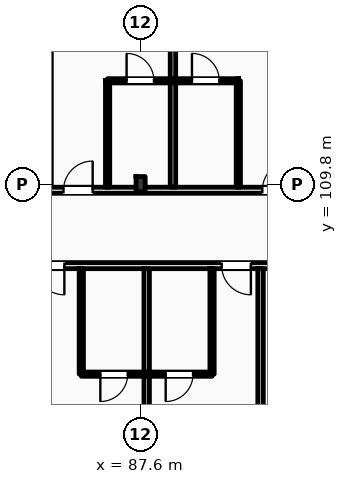
"""IFC4 building model, lengths in metres.
Left out: names, types, materials, properties, quantities, classifications, styles, units other than length and angle.
Written with IfcOpenShell. Run it as: python <this file> out.ifc"""

import sys

from ifc_helpers import new_model, si_unit, direction, frame, frame_2d, origin, origin_2d, place, context, subcontext, project, spatial, rectangle, i_section, extrude, element, fill, save


model = new_model("IFC4")
c1 = context("Model", 3, precision=1e-05, world=origin(), true_north=direction((0.0, 1.0)))
c2 = subcontext(c1, "Body", "Model", "MODEL_VIEW")
j1 = project(units=[si_unit("LENGTHUNIT", "METRE"), si_unit("PLANEANGLEUNIT", "RADIAN")], contexts=[c1])
p1 = place(None, origin())
s1 = spatial("IfcSite", under=j1, at=p1, CompositionType="ELEMENT")
p2 = place(p1, origin())
s2 = spatial("IfcBuilding", under=s1, at=p2, CompositionType="ELEMENT")
p3 = place(p2, frame((0.0, 0.0, 28.2)))
s3 = spatial("IfcBuildingStorey", under=s2, at=p3, CompositionType="ELEMENT", Elevation=28.2)
p4 = place(p3, frame((87.6, 109.8, 0.0), z_axis=(0.0, 0.0, 1.0), x_axis=(1.0, 0.0, 0.0)))
e1 = element("IfcColumn", 1, at=p4, inside=s3, PredefinedType="COLUMN", context=c2, shape_type="SweptSolid", body=[
    extrude(i_section(OverallWidth=0.3, OverallDepth=0.5, WebThickness=0.014, FlangeThickness=0.028, FilletRadius=0.027, at=origin_2d()), origin(), (0.0, 0.0, 1.0), 3.6),
])
p5 = place(p3, frame((10.65, 109.6, 0.0), z_axis=(0.0, 0.0, 1.0), x_axis=(1.0, 0.0, 0.0)))
e2 = element("IfcWall", 2, at=p5, inside=s3, PredefinedType="PARTITIONING", context=c2, shape_type="SweptSolid", body=[
    extrude(rectangle(XDim=109.21, YDim=0.2, at=frame_2d((54.605, 0.0))), origin(), (0.0, 0.0, 1.0), 2.8),
])
p6 = place(p5, frame((12.611, 0.0, 0.0)))
e3 = element("IfcOpeningElement", 3, at=p6, cuts=e2, PredefinedType="OPENING", context=c2, shape_type="SweptSolid", body=[
    extrude(rectangle(XDim=1.02, YDim=2.2, at=frame_2d((0.51, 1.1))), frame((0.0, 0.11, 0.0), z_axis=(0.0, -1.0, 0.0), x_axis=(1.0, 0.0, 0.0)), (0.0, 0.0, 1.0), 0.22),
])
p7 = place(p5, frame((19.451, 0.0, 0.0)))
e4 = element("IfcOpeningElement", 4, at=p7, cuts=e2, PredefinedType="OPENING", context=c2, shape_type="SweptSolid", body=[
    extrude(rectangle(XDim=1.02, YDim=2.2, at=frame_2d((0.51, 1.1))), frame((0.0, 0.11, 0.0), z_axis=(0.0, -1.0, 0.0), x_axis=(1.0, 0.0, 0.0)), (0.0, 0.0, 1.0), 0.22),
])
p8 = place(p5, frame((23.842, 0.0, 0.0)))
e5 = element("IfcOpeningElement", 5, at=p8, cuts=e2, PredefinedType="OPENING", context=c2, shape_type="SweptSolid", body=[
    extrude(rectangle(XDim=1.02, YDim=2.2, at=frame_2d((0.51, 1.1))), frame((0.0, 0.11, 0.0), z_axis=(0.0, -1.0, 0.0), x_axis=(1.0, 0.0, 0.0)), (0.0, 0.0, 1.0), 0.22),
])
p9 = place(p5, frame((26.084, 0.0, 0.0)))
e6 = element("IfcOpeningElement", 6, at=p9, cuts=e2, PredefinedType="OPENING", context=c2, shape_type="SweptSolid", body=[
    extrude(rectangle(XDim=1.02, YDim=2.2, at=frame_2d((0.51, 1.1))), frame((0.0, 0.11, 0.0), z_axis=(0.0, -1.0, 0.0), x_axis=(1.0, 0.0, 0.0)), (0.0, 0.0, 1.0), 0.22),
])
p10 = place(p5, frame((32.655, 0.0, 0.0)))
e7 = element("IfcOpeningElement", 7, at=p10, cuts=e2, PredefinedType="OPENING", context=c2, shape_type="SweptSolid", body=[
    extrude(rectangle(XDim=0.96, YDim=2.2, at=frame_2d((0.48, 1.1))), frame((0.0, 0.11, 0.0), z_axis=(0.0, -1.0, 0.0), x_axis=(1.0, 0.0, 0.0)), (0.0, 0.0, 1.0), 0.22),
])
p11 = place(p5, frame((34.895, 0.0, 0.0)))
e8 = element("IfcOpeningElement", 8, at=p11, cuts=e2, PredefinedType="OPENING", context=c2, shape_type="SweptSolid", body=[
    extrude(rectangle(XDim=0.96, YDim=2.2, at=frame_2d((0.48, 1.1))), frame((0.0, 0.11, 0.0), z_axis=(0.0, -1.0, 0.0), x_axis=(1.0, 0.0, 0.0)), (0.0, 0.0, 1.0), 0.22),
])
p12 = place(p5, frame((41.436, 0.0, 0.0)))
e9 = element("IfcOpeningElement", 9, at=p12, cuts=e2, PredefinedType="OPENING", context=c2, shape_type="SweptSolid", body=[
    extrude(rectangle(XDim=0.96, YDim=2.2, at=frame_2d((0.48, 1.1))), frame((0.0, 0.11, 0.0), z_axis=(0.0, -1.0, 0.0), x_axis=(1.0, 0.0, 0.0)), (0.0, 0.0, 1.0), 0.22),
])
p13 = place(p5, frame((43.427, 0.0, 0.0)))
e10 = element("IfcOpeningElement", 10, at=p13, cuts=e2, PredefinedType="OPENING", context=c2, shape_type="SweptSolid", body=[
    extrude(rectangle(XDim=0.96, YDim=2.2, at=frame_2d((0.48, 1.1))), frame((0.0, 0.11, 0.0), z_axis=(0.0, -1.0, 0.0), x_axis=(1.0, 0.0, 0.0)), (0.0, 0.0, 1.0), 0.22),
])
p14 = place(p5, frame((50.218, 0.0, 0.0)))
e11 = element("IfcOpeningElement", 11, at=p14, cuts=e2, PredefinedType="OPENING", context=c2, shape_type="SweptSolid", body=[
    extrude(rectangle(XDim=0.96, YDim=2.2, at=frame_2d((0.48, 1.1))), frame((0.0, 0.11, 0.0), z_axis=(0.0, -1.0, 0.0), x_axis=(1.0, 0.0, 0.0)), (0.0, 0.0, 1.0), 0.22),
])
p15 = place(p5, frame((54.859, 0.0, 0.0)))
e12 = element("IfcOpeningElement", 12, at=p15, cuts=e2, PredefinedType="OPENING", context=c2, shape_type="SweptSolid", body=[
    extrude(rectangle(XDim=0.96, YDim=2.2, at=frame_2d((0.48, 1.1))), frame((0.0, 0.11, 0.0), z_axis=(0.0, -1.0, 0.0), x_axis=(1.0, 0.0, 0.0)), (0.0, 0.0, 1.0), 0.22),
])
p16 = place(p5, frame((59.0, 0.0, 0.0)))
e13 = element("IfcOpeningElement", 13, at=p16, cuts=e2, PredefinedType="OPENING", context=c2, shape_type="SweptSolid", body=[
    extrude(rectangle(XDim=0.96, YDim=2.2, at=frame_2d((0.48, 1.1))), frame((0.0, 0.11, 0.0), z_axis=(0.0, -1.0, 0.0), x_axis=(1.0, 0.0, 0.0)), (0.0, 0.0, 1.0), 0.22),
])
p17 = place(p5, frame((63.39, 0.0, 0.0)))
e14 = element("IfcOpeningElement", 14, at=p17, cuts=e2, PredefinedType="OPENING", context=c2, shape_type="SweptSolid", body=[
    extrude(rectangle(XDim=0.96, YDim=2.2, at=frame_2d((0.48, 1.1))), frame((0.0, 0.11, 0.0), z_axis=(0.0, -1.0, 0.0), x_axis=(1.0, 0.0, 0.0)), (0.0, 0.0, 1.0), 0.22),
])
p18 = place(p5, frame((65.631, 0.0, 0.0)))
e15 = element("IfcOpeningElement", 15, at=p18, cuts=e2, PredefinedType="OPENING", context=c2, shape_type="SweptSolid", body=[
    extrude(rectangle(XDim=0.96, YDim=2.2, at=frame_2d((0.48, 1.1))), frame((0.0, 0.11, 0.0), z_axis=(0.0, -1.0, 0.0), x_axis=(1.0, 0.0, 0.0)), (0.0, 0.0, 1.0), 0.22),
])
p19 = place(p5, frame((72.172, 0.0, 0.0)))
e16 = element("IfcOpeningElement", 16, at=p19, cuts=e2, PredefinedType="OPENING", context=c2, shape_type="SweptSolid", body=[
    extrude(rectangle(XDim=0.96, YDim=2.2, at=frame_2d((0.48, 1.1))), frame((0.0, 0.11, 0.0), z_axis=(0.0, -1.0, 0.0), x_axis=(1.0, 0.0, 0.0)), (0.0, 0.0, 1.0), 0.22),
])
p20 = place(p5, frame((74.413, 0.0, 0.0)))
e17 = element("IfcOpeningElement", 17, at=p20, cuts=e2, PredefinedType="OPENING", context=c2, shape_type="SweptSolid", body=[
    extrude(rectangle(XDim=0.96, YDim=2.2, at=frame_2d((0.48, 1.1))), frame((0.0, 0.11, 0.0), z_axis=(0.0, -1.0, 0.0), x_axis=(1.0, 0.0, 0.0)), (0.0, 0.0, 1.0), 0.22),
])
p21 = place(p5, frame((80.954, 0.0, 0.0)))
e18 = element("IfcOpeningElement", 18, at=p21, cuts=e2, PredefinedType="OPENING", context=c2, shape_type="SweptSolid", body=[
    extrude(rectangle(XDim=0.96, YDim=2.2, at=frame_2d((0.48, 1.1))), frame((0.0, 0.11, 0.0), z_axis=(0.0, -1.0, 0.0), x_axis=(1.0, 0.0, 0.0)), (0.0, 0.0, 1.0), 0.22),
])
p22 = place(p5, frame((83.195, 0.0, 0.0)))
e19 = element("IfcOpeningElement", 19, at=p22, cuts=e2, PredefinedType="OPENING", context=c2, shape_type="SweptSolid", body=[
    extrude(rectangle(XDim=0.96, YDim=2.2, at=frame_2d((0.48, 1.1))), frame((0.0, 0.11, 0.0), z_axis=(0.0, -1.0, 0.0), x_axis=(1.0, 0.0, 0.0)), (0.0, 0.0, 1.0), 0.22),
])
p23 = place(p5, frame((89.735, 0.0, 0.0)))
e20 = element("IfcOpeningElement", 20, at=p23, cuts=e2, PredefinedType="OPENING", context=c2, shape_type="SweptSolid", body=[
    extrude(rectangle(XDim=0.96, YDim=2.2, at=frame_2d((0.48, 1.1))), frame((0.0, 0.11, 0.0), z_axis=(0.0, -1.0, 0.0), x_axis=(1.0, 0.0, 0.0)), (0.0, 0.0, 1.0), 0.22),
])
p24 = place(p5, frame((94.126, 0.0, 0.0)))
e21 = element("IfcOpeningElement", 21, at=p24, cuts=e2, PredefinedType="OPENING", context=c2, shape_type="SweptSolid", body=[
    extrude(rectangle(XDim=0.96, YDim=2.2, at=frame_2d((0.48, 1.1))), frame((0.0, 0.11, 0.0), z_axis=(0.0, -1.0, 0.0), x_axis=(1.0, 0.0, 0.0)), (0.0, 0.0, 1.0), 0.22),
])
p25 = place(p5, frame((98.517, 0.0, 0.0)))
e22 = element("IfcOpeningElement", 22, at=p25, cuts=e2, PredefinedType="OPENING", context=c2, shape_type="SweptSolid", body=[
    extrude(rectangle(XDim=0.96, YDim=2.2, at=frame_2d((0.48, 1.1))), frame((0.0, 0.11, 0.0), z_axis=(0.0, -1.0, 0.0), x_axis=(1.0, 0.0, 0.0)), (0.0, 0.0, 1.0), 0.22),
])
p26 = place(p5, frame((102.908, 0.0, 0.0)))
e23 = element("IfcOpeningElement", 23, at=p26, cuts=e2, PredefinedType="OPENING", context=c2, shape_type="SweptSolid", body=[
    extrude(rectangle(XDim=0.96, YDim=2.2, at=frame_2d((0.48, 1.1))), frame((0.0, 0.11, 0.0), z_axis=(0.0, -1.0, 0.0), x_axis=(1.0, 0.0, 0.0)), (0.0, 0.0, 1.0), 0.22),
])
p27 = place(p5, frame((105.099, 0.0, 0.0)))
e24 = element("IfcOpeningElement", 24, at=p27, cuts=e2, PredefinedType="OPENING", context=c2, shape_type="SweptSolid", body=[
    extrude(rectangle(XDim=0.96, YDim=2.2, at=frame_2d((0.48, 1.1))), frame((0.0, 0.11, 0.0), z_axis=(0.0, -1.0, 0.0), x_axis=(1.0, 0.0, 0.0)), (0.0, 0.0, 1.0), 0.22),
])
p28 = place(p5, frame((2.716, 0.0, 0.0)))
e25 = element("IfcOpeningElement", 25, at=p28, cuts=e2, PredefinedType="OPENING", context=c2, shape_type="SweptSolid", body=[
    extrude(rectangle(XDim=1.35, YDim=2.25, at=frame_2d((0.675, 1.125))), frame((0.0, 0.11, 0.0), z_axis=(0.0, -1.0, 0.0), x_axis=(1.0, 0.0, 0.0)), (0.0, 0.0, 1.0), 0.22),
])
p29 = place(p5, frame((6.65, 0.0, 0.0)))
e26 = element("IfcOpeningElement", 26, at=p29, cuts=e2, PredefinedType="OPENING", context=c2, shape_type="SweptSolid", body=[
    extrude(rectangle(XDim=1.35, YDim=2.25, at=frame_2d((0.675, 1.125))), frame((0.0, 0.11, 0.0), z_axis=(0.0, -1.0, 0.0), x_axis=(1.0, 0.0, 0.0)), (0.0, 0.0, 1.0), 0.22),
])
p30 = place(p5, frame((10.583, 0.0, 0.0)))
e27 = element("IfcOpeningElement", 27, at=p30, cuts=e2, PredefinedType="OPENING", context=c2, shape_type="SweptSolid", body=[
    extrude(rectangle(XDim=1.35, YDim=2.25, at=frame_2d((0.675, 1.125))), frame((0.0, 0.11, 0.0), z_axis=(0.0, -1.0, 0.0), x_axis=(1.0, 0.0, 0.0)), (0.0, 0.0, 1.0), 0.22),
])
p31 = place(p3, frame((79.76, 107.12, 0.0), z_axis=(0.0, 0.0, 1.0), x_axis=(1.0, 0.0, 0.0)))
e28 = element("IfcWall", 28, at=p31, inside=s3, PredefinedType="PARTITIONING", context=c2, shape_type="SweptSolid", body=[
    extrude(rectangle(XDim=40.1, YDim=0.2, at=frame_2d((20.05, 0.0))), origin(), (0.0, 0.0, 1.0), 3.36),
])
p32 = place(p31, frame((2.497, 0.0, 0.0)))
e29 = element("IfcOpeningElement", 29, at=p32, cuts=e28, PredefinedType="OPENING", context=c2, shape_type="SweptSolid", body=[
    extrude(rectangle(XDim=0.96, YDim=2.2, at=frame_2d((0.48, 1.1))), frame((0.0, 0.11, 0.0), z_axis=(0.0, -1.0, 0.0), x_axis=(1.0, 0.0, 0.0)), (0.0, 0.0, 1.0), 0.22),
])
p33 = place(p31, frame((4.372, 0.0, 0.0)))
e30 = element("IfcOpeningElement", 30, at=p33, cuts=e28, PredefinedType="OPENING", context=c2, shape_type="SweptSolid", body=[
    extrude(rectangle(XDim=0.96, YDim=2.2, at=frame_2d((0.48, 1.1))), frame((0.0, 0.11, 0.0), z_axis=(0.0, -1.0, 0.0), x_axis=(1.0, 0.0, 0.0)), (0.0, 0.0, 1.0), 0.22),
])
p34 = place(p31, frame((10.507, 0.0, 0.0)))
e31 = element("IfcOpeningElement", 31, at=p34, cuts=e28, PredefinedType="OPENING", context=c2, shape_type="SweptSolid", body=[
    extrude(rectangle(XDim=0.96, YDim=2.2, at=frame_2d((0.48, 1.1))), frame((0.0, 0.11, 0.0), z_axis=(0.0, -1.0, 0.0), x_axis=(1.0, 0.0, 0.0)), (0.0, 0.0, 1.0), 0.22),
])
p35 = place(p31, frame((12.342, 0.0, 0.0)))
e32 = element("IfcOpeningElement", 32, at=p35, cuts=e28, PredefinedType="OPENING", context=c2, shape_type="SweptSolid", body=[
    extrude(rectangle(XDim=0.96, YDim=2.2, at=frame_2d((0.48, 1.1))), frame((0.0, 0.11, 0.0), z_axis=(0.0, -1.0, 0.0), x_axis=(1.0, 0.0, 0.0)), (0.0, 0.0, 1.0), 0.22),
])
p36 = place(p31, frame((18.477, 0.0, 0.0)))
e33 = element("IfcOpeningElement", 33, at=p36, cuts=e28, PredefinedType="OPENING", context=c2, shape_type="SweptSolid", body=[
    extrude(rectangle(XDim=0.96, YDim=2.2, at=frame_2d((0.48, 1.1))), frame((0.0, 0.11, 0.0), z_axis=(0.0, -1.0, 0.0), x_axis=(1.0, 0.0, 0.0)), (0.0, 0.0, 1.0), 0.22),
])
p37 = place(p31, frame((20.312, 0.0, 0.0)))
e34 = element("IfcOpeningElement", 34, at=p37, cuts=e28, PredefinedType="OPENING", context=c2, shape_type="SweptSolid", body=[
    extrude(rectangle(XDim=0.96, YDim=2.2, at=frame_2d((0.48, 1.1))), frame((0.0, 0.11, 0.0), z_axis=(0.0, -1.0, 0.0), x_axis=(1.0, 0.0, 0.0)), (0.0, 0.0, 1.0), 0.22),
])
p38 = place(p31, frame((26.447, 0.0, 0.0)))
e35 = element("IfcOpeningElement", 35, at=p38, cuts=e28, PredefinedType="OPENING", context=c2, shape_type="SweptSolid", body=[
    extrude(rectangle(XDim=0.96, YDim=2.2, at=frame_2d((0.48, 1.1))), frame((0.0, 0.11, 0.0), z_axis=(0.0, -1.0, 0.0), x_axis=(1.0, 0.0, 0.0)), (0.0, 0.0, 1.0), 0.22),
])
p39 = place(p31, frame((28.282, 0.0, 0.0)))
e36 = element("IfcOpeningElement", 36, at=p39, cuts=e28, PredefinedType="OPENING", context=c2, shape_type="SweptSolid", body=[
    extrude(rectangle(XDim=0.96, YDim=2.2, at=frame_2d((0.48, 1.1))), frame((0.0, 0.11, 0.0), z_axis=(0.0, -1.0, 0.0), x_axis=(1.0, 0.0, 0.0)), (0.0, 0.0, 1.0), 0.22),
])
p40 = place(p31, frame((34.417, 0.0, 0.0)))
e37 = element("IfcOpeningElement", 37, at=p40, cuts=e28, PredefinedType="OPENING", context=c2, shape_type="SweptSolid", body=[
    extrude(rectangle(XDim=0.96, YDim=2.2, at=frame_2d((0.48, 1.1))), frame((0.0, 0.11, 0.0), z_axis=(0.0, -1.0, 0.0), x_axis=(1.0, 0.0, 0.0)), (0.0, 0.0, 1.0), 0.22),
])
p41 = place(p31, frame((36.212, 0.0, 0.0)))
e38 = element("IfcOpeningElement", 38, at=p41, cuts=e28, PredefinedType="OPENING", context=c2, shape_type="SweptSolid", body=[
    extrude(rectangle(XDim=0.96, YDim=2.2, at=frame_2d((0.48, 1.1))), frame((0.0, 0.11, 0.0), z_axis=(0.0, -1.0, 0.0), x_axis=(1.0, 0.0, 0.0)), (0.0, 0.0, 1.0), 0.22),
])
p42 = place(p3, frame((88.664, 109.7, 0.0), z_axis=(0.0, 0.0, 1.0), x_axis=(0.0, 1.0, 0.0)))
e39 = element("IfcWall", 39, at=p42, inside=s3, PredefinedType="PARTITIONING", context=c2, shape_type="SweptSolid", body=[
    extrude(rectangle(XDim=8.15, YDim=0.18, at=frame_2d((4.075, 0.0))), origin(), (0.0, 0.0, 1.0), 3.36),
])
p43 = place(p3, frame((86.514, 109.7, 0.0), z_axis=(0.0, 0.0, 1.0), x_axis=(0.0, 1.0, 0.0)))
e40 = element("IfcWall", 40, at=p43, inside=s3, PredefinedType="PARTITIONING", context=c2, shape_type="SweptSolid", body=[
    extrude(rectangle(XDim=3.5, YDim=0.14, at=frame_2d((1.75, 0.0))), origin(), (0.0, 0.0, 1.0), 3.36),
])
p44 = place(p3, frame((86.514, 113.2, 0.0), z_axis=(0.0, 0.0, 1.0), x_axis=(1.0, 0.0, 0.0)))
e41 = element("IfcWall", 41, at=p44, inside=s3, PredefinedType="PARTITIONING", context=c2, shape_type="SweptSolid", body=[
    extrude(rectangle(XDim=2.15, YDim=0.14, at=frame_2d((1.075, 0.0))), origin(), (0.0, 0.0, 1.0), 3.36),
])
p45 = place(p44, frame((0.625, 0.0, 0.0)))
e42 = element("IfcOpeningElement", 42, at=p45, cuts=e41, PredefinedType="OPENING", context=c2, shape_type="SweptSolid", body=[
    extrude(rectangle(XDim=0.9, YDim=2.1, at=frame_2d((0.45, 1.05))), frame((0.0, 0.08, 0.0), z_axis=(0.0, -1.0, 0.0), x_axis=(1.0, 0.0, 0.0)), (0.0, 0.0, 1.0), 0.16),
])
p46 = place(p3, frame((90.814, 109.7, 0.0), z_axis=(0.0, 0.0, 1.0), x_axis=(0.0, 1.0, 0.0)))
e43 = element("IfcWall", 43, at=p46, inside=s3, PredefinedType="PARTITIONING", context=c2, shape_type="SweptSolid", body=[
    extrude(rectangle(XDim=3.5, YDim=0.14, at=frame_2d((1.75, 0.0))), origin(), (0.0, 0.0, 1.0), 3.36),
])
p47 = place(p3, frame((88.664, 113.2, 0.0), z_axis=(0.0, 0.0, 1.0), x_axis=(1.0, 0.0, 0.0)))
e44 = element("IfcWall", 44, at=p47, inside=s3, PredefinedType="PARTITIONING", context=c2, shape_type="SweptSolid", body=[
    extrude(rectangle(XDim=2.15, YDim=0.14, at=frame_2d((1.075, 0.0))), origin(), (0.0, 0.0, 1.0), 3.36),
])
p48 = place(p47, frame((0.625, 0.0, 0.0)))
e45 = element("IfcOpeningElement", 45, at=p48, cuts=e44, PredefinedType="OPENING", context=c2, shape_type="SweptSolid", body=[
    extrude(rectangle(XDim=0.9, YDim=2.1, at=frame_2d((0.45, 1.05))), frame((0.0, 0.08, 0.0), z_axis=(0.0, -1.0, 0.0), x_axis=(1.0, 0.0, 0.0)), (0.0, 0.0, 1.0), 0.16),
])
p49 = place(p3, frame((87.8, 96.14, 0.0), z_axis=(0.0, 0.0, 1.0), x_axis=(0.0, 1.0, 0.0)))
e46 = element("IfcWall", 46, at=p49, inside=s3, PredefinedType="PARTITIONING", context=c2, shape_type="SweptSolid", body=[
    extrude(rectangle(XDim=10.88, YDim=0.18, at=frame_2d((5.44, 0.0))), origin(), (0.0, 0.0, 1.0), 2.99),
])
p50 = place(p3, frame((85.65, 103.55, 0.0), z_axis=(0.0, 0.0, 1.0), x_axis=(0.0, 1.0, 0.0)))
e47 = element("IfcWall", 47, at=p50, inside=s3, PredefinedType="PARTITIONING", context=c2, shape_type="SweptSolid", body=[
    extrude(rectangle(XDim=3.47, YDim=0.14, at=frame_2d((1.735, 0.0))), origin(), (0.0, 0.0, 1.0), 3.36),
])
p51 = place(p3, frame((85.65, 103.55, 0.0), z_axis=(0.0, 0.0, 1.0), x_axis=(1.0, 0.0, 0.0)))
e48 = element("IfcWall", 48, at=p51, inside=s3, PredefinedType="PARTITIONING", context=c2, shape_type="SweptSolid", body=[
    extrude(rectangle(XDim=2.15, YDim=0.14, at=frame_2d((1.075, 0.0))), origin(), (0.0, 0.0, 1.0), 3.36),
])
p52 = place(p51, frame((0.625, 0.0, 0.0)))
e49 = element("IfcOpeningElement", 49, at=p52, cuts=e48, PredefinedType="OPENING", context=c2, shape_type="SweptSolid", body=[
    extrude(rectangle(XDim=0.9, YDim=2.1, at=frame_2d((0.45, 1.05))), frame((0.0, 0.08, 0.0), z_axis=(0.0, -1.0, 0.0), x_axis=(1.0, 0.0, 0.0)), (0.0, 0.0, 1.0), 0.16),
])
p53 = place(p3, frame((91.545, 96.14, 0.0), z_axis=(0.0, 0.0, 1.0), x_axis=(0.0, 1.0, 0.0)))
e50 = element("IfcWall", 50, at=p53, inside=s3, PredefinedType="PARTITIONING", context=c2, shape_type="SweptSolid", body=[
    extrude(rectangle(XDim=10.88, YDim=0.18, at=frame_2d((5.44, 0.0))), origin(), (0.0, 0.0, 1.0), 3.36),
])
p54 = place(p3, frame((89.95, 103.55, 0.0), z_axis=(0.0, 0.0, 1.0), x_axis=(0.0, 1.0, 0.0)))
e51 = element("IfcWall", 51, at=p54, inside=s3, PredefinedType="PARTITIONING", context=c2, shape_type="SweptSolid", body=[
    extrude(rectangle(XDim=3.47, YDim=0.14, at=frame_2d((1.735, 0.0))), origin(), (0.0, 0.0, 1.0), 3.36),
])
p55 = place(p3, frame((87.8, 103.55, 0.0), z_axis=(0.0, 0.0, 1.0), x_axis=(1.0, 0.0, 0.0)))
e52 = element("IfcWall", 52, at=p55, inside=s3, PredefinedType="PARTITIONING", context=c2, shape_type="SweptSolid", body=[
    extrude(rectangle(XDim=2.15, YDim=0.14, at=frame_2d((1.075, 0.0))), origin(), (0.0, 0.0, 1.0), 3.36),
])
p56 = place(p55, frame((0.625, 0.0, 0.0)))
e53 = element("IfcOpeningElement", 53, at=p56, cuts=e52, PredefinedType="OPENING", context=c2, shape_type="SweptSolid", body=[
    extrude(rectangle(XDim=0.9, YDim=2.1, at=frame_2d((0.45, 1.05))), frame((0.0, 0.08, 0.0), z_axis=(0.0, -1.0, 0.0), x_axis=(1.0, 0.0, 0.0)), (0.0, 0.0, 1.0), 0.16),
])
p57 = place(p20, origin())
e54 = element("IfcDoor", 54, at=p57, inside=s3, OperationType="SINGLE_SWING_RIGHT", PredefinedType="DOOR", context=c2, shape_type="SweptSolid", body=[
    extrude(rectangle(XDim=0.96, YDim=2.2, at=frame_2d((0.48, 1.1))), frame((0.0, 0.025, 0.0), z_axis=(0.0, -1.0, 0.0), x_axis=(1.0, 0.0, 0.0)), (0.0, 0.0, 1.0), 0.05),
])
fill(e17, e54)
p58 = place(p45, origin())
e55 = element("IfcDoor", 55, at=p58, inside=s3, OperationType="SINGLE_SWING_LEFT", PredefinedType="DOOR", context=c2, shape_type="SweptSolid", body=[
    extrude(rectangle(XDim=0.9, YDim=2.1, at=frame_2d((0.45, 1.05))), frame((0.0, 0.025, 0.0), z_axis=(0.0, -1.0, 0.0), x_axis=(1.0, 0.0, 0.0)), (0.0, 0.0, 1.0), 0.05),
])
fill(e42, e55)
p59 = place(p21, origin())
e56 = element("IfcDoor", 56, at=p59, inside=s3, OperationType="SINGLE_SWING_RIGHT", PredefinedType="DOOR", context=c2, shape_type="SweptSolid", body=[
    extrude(rectangle(XDim=0.96, YDim=2.2, at=frame_2d((0.48, 1.1))), frame((0.0, 0.025, 0.0), z_axis=(0.0, -1.0, 0.0), x_axis=(1.0, 0.0, 0.0)), (0.0, 0.0, 1.0), 0.05),
])
fill(e18, e56)
p60 = place(p48, origin())
e57 = element("IfcDoor", 57, at=p60, inside=s3, OperationType="SINGLE_SWING_LEFT", PredefinedType="DOOR", context=c2, shape_type="SweptSolid", body=[
    extrude(rectangle(XDim=0.9, YDim=2.1, at=frame_2d((0.45, 1.05))), frame((0.0, 0.025, 0.0), z_axis=(0.0, -1.0, 0.0), x_axis=(1.0, 0.0, 0.0)), (0.0, 0.0, 1.0), 0.05),
])
fill(e45, e57)
p61 = place(p33, frame((0.96, 0.0, 0.0), z_axis=(0.0, 0.0, 1.0), x_axis=(-1.0, 0.0, 0.0)))
e58 = element("IfcDoor", 58, at=p61, inside=s3, OperationType="SINGLE_SWING_RIGHT", PredefinedType="DOOR", context=c2, shape_type="SweptSolid", body=[
    extrude(rectangle(XDim=0.96, YDim=2.2, at=frame_2d((0.48, 1.1))), frame((0.0, 0.025, 0.0), z_axis=(0.0, -1.0, 0.0), x_axis=(1.0, 0.0, 0.0)), (0.0, 0.0, 1.0), 0.05),
])
fill(e30, e58)
p62 = place(p52, frame((0.9, 0.0, 0.0), z_axis=(0.0, 0.0, 1.0), x_axis=(-1.0, 0.0, 0.0)))
e59 = element("IfcDoor", 59, at=p62, inside=s3, OperationType="SINGLE_SWING_LEFT", PredefinedType="DOOR", context=c2, shape_type="SweptSolid", body=[
    extrude(rectangle(XDim=0.9, YDim=2.1, at=frame_2d((0.45, 1.05))), frame((0.0, 0.025, 0.0), z_axis=(0.0, -1.0, 0.0), x_axis=(1.0, 0.0, 0.0)), (0.0, 0.0, 1.0), 0.05),
])
fill(e49, e59)
p63 = place(p34, frame((0.96, 0.0, 0.0), z_axis=(0.0, 0.0, 1.0), x_axis=(-1.0, 0.0, 0.0)))
e60 = element("IfcDoor", 60, at=p63, inside=s3, OperationType="SINGLE_SWING_RIGHT", PredefinedType="DOOR", context=c2, shape_type="SweptSolid", body=[
    extrude(rectangle(XDim=0.96, YDim=2.2, at=frame_2d((0.48, 1.1))), frame((0.0, 0.025, 0.0), z_axis=(0.0, -1.0, 0.0), x_axis=(1.0, 0.0, 0.0)), (0.0, 0.0, 1.0), 0.05),
])
fill(e31, e60)
p64 = place(p56, frame((0.9, 0.0, 0.0), z_axis=(0.0, 0.0, 1.0), x_axis=(-1.0, 0.0, 0.0)))
e61 = element("IfcDoor", 61, at=p64, inside=s3, OperationType="SINGLE_SWING_LEFT", PredefinedType="DOOR", context=c2, shape_type="SweptSolid", body=[
    extrude(rectangle(XDim=0.9, YDim=2.1, at=frame_2d((0.45, 1.05))), frame((0.0, 0.025, 0.0), z_axis=(0.0, -1.0, 0.0), x_axis=(1.0, 0.0, 0.0)), (0.0, 0.0, 1.0), 0.05),
])
fill(e53, e61)
save(model, sys.argv[1])
